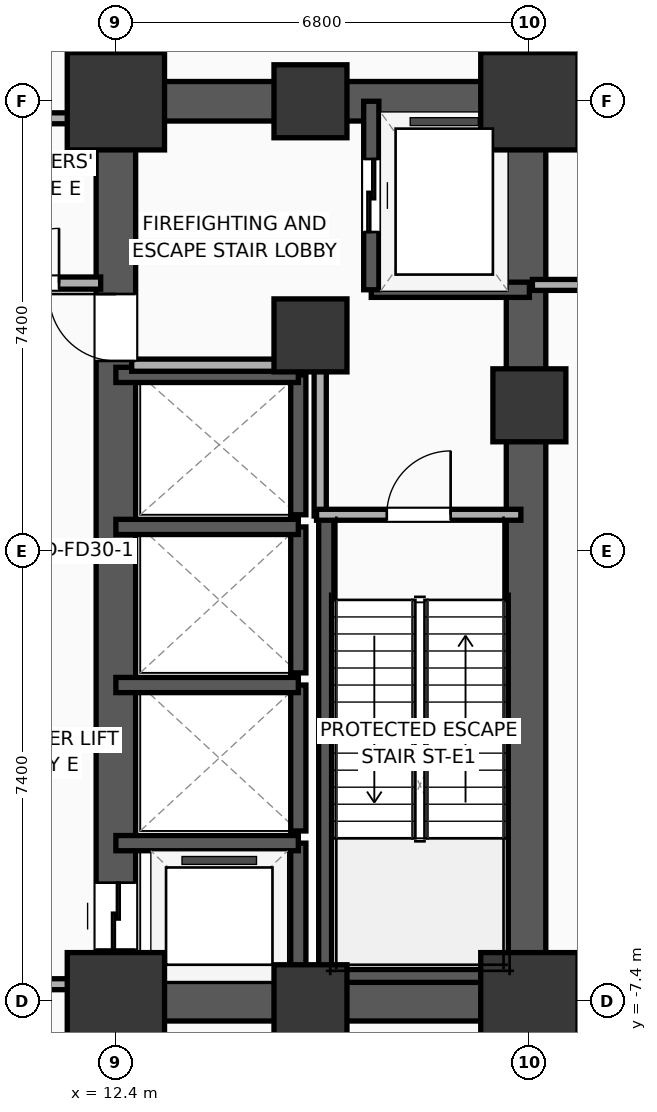
"""IFC4 building model, lengths in metres.
Left out: names, types, materials, properties, quantities, classifications, styles, units other than length and angle.
Written with IfcOpenShell. Run it as: python <this file> out.ifc"""

import sys

from ifc_helpers import new_model, si_unit, direction, frame, frame_2d, origin, origin_2d, place, context, subcontext, project, spatial, rectangle, extrude, element, fill, save


model = new_model("IFC4")
c1 = context("Model", 3, precision=1e-05, world=origin(), true_north=direction((0.0, 1.0)))
c2 = subcontext(c1, "Body", "Model", "MODEL_VIEW")
j1 = project(units=[si_unit("LENGTHUNIT", "METRE"), si_unit("PLANEANGLEUNIT", "RADIAN")], contexts=[c1])
p1 = place(None, origin())
s1 = spatial("IfcSite", under=j1, at=p1, CompositionType="ELEMENT")
p2 = place(p1, origin())
s2 = spatial("IfcBuilding", under=s1, at=p2, CompositionType="ELEMENT")
p3 = place(p2, frame((0.0, 0.0, 20.8)))
s3 = spatial("IfcBuildingStorey", under=s2, at=p3, CompositionType="ELEMENT", Elevation=20.8)
p4 = place(p3, frame((12.4, -7.4, 0.0), z_axis=(0.0, 0.0, 1.0), x_axis=(1.0, 0.0, 0.0)))
e1 = element("IfcColumn", 1, at=p4, inside=s3, PredefinedType="COLUMN", context=c2, shape_type="SweptSolid", body=[
    extrude(rectangle(XDim=1.6, YDim=1.6, at=origin_2d()), origin(), (0.0, 0.0, 1.0), 5.2),
])
p5 = place(p3, frame((15.6, 3.55, 0.0), z_axis=(0.0, 0.0, 1.0), x_axis=(1.0, 0.0, 0.0)))
e2 = element("IfcColumn", 2, at=p5, inside=s3, PredefinedType="COLUMN", context=c2, shape_type="SweptSolid", body=[
    extrude(rectangle(XDim=1.2, YDim=1.2, at=origin_2d()), origin(), (0.0, 0.0, 1.0), 5.2),
])
p6 = place(p3, frame((12.4, 7.4, 0.0), z_axis=(0.0, 0.0, 1.0), x_axis=(1.0, 0.0, 0.0)))
e3 = element("IfcColumn", 3, at=p6, inside=s3, PredefinedType="COLUMN", context=c2, shape_type="SweptSolid", body=[
    extrude(rectangle(XDim=1.6, YDim=1.6, at=origin_2d()), origin(), (0.0, 0.0, 1.0), 5.2),
])
for number, where, z_axis, x_axis in (
    (4, (15.6, -7.4, 0.0), (0.0, 0.0, 1.0), (1.0, 0.0, 0.0)),
    (5, (15.6, 7.4, 0.0), (0.0, 0.0, 1.0), (1.0, 0.0, 0.0)),
):
    element("IfcColumn", number, at=place(p3, frame(where, z_axis=z_axis, x_axis=x_axis)), inside=s3, PredefinedType="COLUMN", context=c2, shape_type="SweptSolid", body=[
        extrude(rectangle(XDim=1.2, YDim=1.2, at=origin_2d()), origin(), (0.0, 0.0, 1.0), 5.2),
    ])
p7 = place(p3, frame((19.2, -7.4, 0.0), z_axis=(0.0, 0.0, 1.0), x_axis=(1.0, 0.0, 0.0)))
e6 = element("IfcColumn", 6, at=p7, inside=s3, PredefinedType="COLUMN", context=c2, shape_type="SweptSolid", body=[
    extrude(rectangle(XDim=1.6, YDim=1.6, at=origin_2d()), origin(), (0.0, 0.0, 1.0), 5.2),
])
p8 = place(p3, frame((19.2, 2.4, 0.0), z_axis=(0.0, 0.0, 1.0), x_axis=(1.0, 0.0, 0.0)))
e7 = element("IfcColumn", 7, at=p8, inside=s3, PredefinedType="COLUMN", context=c2, shape_type="SweptSolid", body=[
    extrude(rectangle(XDim=1.2, YDim=1.2, at=origin_2d()), origin(), (0.0, 0.0, 1.0), 5.2),
])
p9 = place(p3, frame((19.2, 7.4, 0.0), z_axis=(0.0, 0.0, 1.0), x_axis=(1.0, 0.0, 0.0)))
e8 = element("IfcColumn", 8, at=p9, inside=s3, PredefinedType="COLUMN", context=c2, shape_type="SweptSolid", body=[
    extrude(rectangle(XDim=1.6, YDim=1.6, at=origin_2d()), origin(), (0.0, 0.0, 1.0), 5.2),
])
for number, where, z_axis, x_axis in (
    (9, (12.075, -7.4, 0.0), (0.0, 0.0, 1.0), (1.0, 0.0, 0.0)),
    (10, (12.075, 7.4, 0.0), (0.0, 0.0, 1.0), (1.0, 0.0, 0.0)),
):
    element("IfcWall", number, at=place(p3, frame(where, z_axis=z_axis, x_axis=x_axis)), inside=s3, PredefinedType="SHEAR", context=c2, shape_type="SweptSolid", body=[
        extrude(rectangle(XDim=7.45, YDim=0.65, at=frame_2d((3.725, 0.0))), origin(), (0.0, 0.0, 1.0), 4.95),
    ])
p10 = place(p3, frame((12.4, -7.4, 0.0), z_axis=(0.0, 0.0, 1.0), x_axis=(0.0, 1.0, 0.0)))
e11 = element("IfcWall", 11, at=p10, inside=s3, PredefinedType="SHEAR", context=c2, shape_type="SweptSolid", body=[
    extrude(rectangle(XDim=14.8, YDim=0.65, at=frame_2d((7.4, 0.0))), origin(), (0.0, 0.0, 1.0), 4.95),
])
p11 = place(p10, frame((0.85, 0.0, 0.0)))
e12 = element("IfcOpeningElement", 12, at=p11, cuts=e11, PredefinedType="OPENING", context=c2, shape_type="SweptSolid", body=[
    extrude(rectangle(XDim=1.1, YDim=2.05, at=frame_2d((0.55, 1.025))), frame((0.0, 0.335, 0.0), z_axis=(0.0, -1.0, 0.0), x_axis=(1.0, 0.0, 0.0)), (0.0, 0.0, 1.0), 0.67),
])
p12 = place(p10, frame((10.53, 0.0, 0.0)))
e13 = element("IfcOpeningElement", 13, at=p12, cuts=e11, PredefinedType="OPENING", context=c2, shape_type="SweptSolid", body=[
    extrude(rectangle(XDim=1.1, YDim=2.05, at=frame_2d((0.55, 1.025))), frame((0.0, 0.335, 0.0), z_axis=(0.0, -1.0, 0.0), x_axis=(1.0, 0.0, 0.0)), (0.0, 0.0, 1.0), 0.67),
])
p13 = place(p3, frame((19.145, -7.4, 0.0), z_axis=(0.0, 0.0, 1.0), x_axis=(0.0, 1.0, 0.0)))
e14 = element("IfcWall", 14, at=p13, inside=s3, PredefinedType="SHEAR", context=c2, shape_type="SweptSolid", body=[
    extrude(rectangle(XDim=14.8, YDim=0.65, at=frame_2d((7.4, 0.0))), origin(), (0.0, 0.0, 1.0), 4.95),
])
p14 = place(p3, frame((15.86, -7.085, 0.0), z_axis=(0.0, 0.0, 1.0), x_axis=(0.0, 1.0, 0.0)))
e15 = element("IfcWall", 15, at=p14, inside=s3, PredefinedType="SOLIDWALL", context=c2, shape_type="SweptSolid", body=[
    extrude(rectangle(XDim=7.685, YDim=0.25, at=frame_2d((3.843, 0.0))), origin(), (0.0, 0.0, 1.0), 4.95),
])
p15 = place(p3, frame((15.74, -6.965, 0.0), z_axis=(0.0, 0.0, 1.0), x_axis=(1.0, 0.0, 0.0)))
e16 = element("IfcWall", 16, at=p15, inside=s3, PredefinedType="SOLIDWALL", context=c2, shape_type="SweptSolid", body=[
    extrude(rectangle(XDim=3.46, YDim=0.25, at=frame_2d((1.73, 0.0))), origin(), (0.0, 0.0, 1.0), 4.95),
])
p16 = place(p3, frame((16.6, 4.3, 0.0), z_axis=(0.0, 0.0, 1.0), x_axis=(1.0, 0.0, 0.0)))
e17 = element("IfcWall", 17, at=p16, inside=s3, PredefinedType="SOLIDWALL", context=c2, shape_type="SweptSolid", body=[
    extrude(rectangle(XDim=2.6, YDim=0.25, at=frame_2d((1.3, 0.0))), origin(), (0.0, 0.0, 1.0), 4.95),
])
p17 = place(p3, frame((16.6, 7.4, 0.0), z_axis=(0.0, 0.0, 1.0), x_axis=(0.0, -1.0, 0.0)))
e18 = element("IfcWall", 18, at=p17, inside=s3, PredefinedType="SOLIDWALL", context=c2, shape_type="SweptSolid", body=[
    extrude(rectangle(XDim=3.1, YDim=0.25, at=frame_2d((1.55, 0.0))), origin(), (0.0, 0.0, 1.0), 4.95),
])
p18 = place(p17, frame((0.95, 0.0, 0.0)))
e19 = element("IfcOpeningElement", 19, at=p18, cuts=e18, PredefinedType="OPENING", context=c2, shape_type="SweptSolid", body=[
    extrude(rectangle(XDim=1.2, YDim=2.05, at=frame_2d((0.6, 1.025))), frame((0.0, 0.135, 0.0), z_axis=(0.0, -1.0, 0.0), x_axis=(1.0, 0.0, 0.0)), (0.0, 0.0, 1.0), 0.27),
])
p19 = place(p3, frame((15.4, -7.4, 0.0), z_axis=(0.0, 0.0, 1.0), x_axis=(0.0, 1.0, 0.0)))
e20 = element("IfcWall", 20, at=p19, inside=s3, PredefinedType="SOLIDWALL", context=c2, shape_type="SweptSolid", body=[
    extrude(rectangle(XDim=2.6, YDim=0.25, at=frame_2d((1.3, 0.0))), origin(), (0.0, 0.0, 1.0), 4.95),
])
p20 = place(p3, frame((15.4, -4.8, 0.0), z_axis=(0.0, 0.0, 1.0), x_axis=(-1.0, 0.0, 0.0)))
e21 = element("IfcWall", 21, at=p20, inside=s3, PredefinedType="SOLIDWALL", context=c2, shape_type="SweptSolid", body=[
    extrude(rectangle(XDim=3.0, YDim=0.25, at=frame_2d((1.5, 0.0))), origin(), (0.0, 0.0, 1.0), 4.95),
])
p21 = place(p3, frame((15.4, -4.6, 0.0), z_axis=(0.0, 0.0, 1.0), x_axis=(0.0, 1.0, 0.0)))
e22 = element("IfcWall", 22, at=p21, inside=s3, PredefinedType="SOLIDWALL", context=c2, shape_type="SweptSolid", body=[
    extrude(rectangle(XDim=2.4, YDim=0.25, at=frame_2d((1.2, 0.0))), origin(), (0.0, 0.0, 1.0), 4.95),
])
p22 = place(p3, frame((15.4, -2.2, 0.0), z_axis=(0.0, 0.0, 1.0), x_axis=(-1.0, 0.0, 0.0)))
e23 = element("IfcWall", 23, at=p22, inside=s3, PredefinedType="SOLIDWALL", context=c2, shape_type="SweptSolid", body=[
    extrude(rectangle(XDim=3.0, YDim=0.25, at=frame_2d((1.5, 0.0))), origin(), (0.0, 0.0, 1.0), 4.95),
])
p23 = place(p3, frame((15.4, -2.0, 0.0), z_axis=(0.0, 0.0, 1.0), x_axis=(0.0, 1.0, 0.0)))
e24 = element("IfcWall", 24, at=p23, inside=s3, PredefinedType="SOLIDWALL", context=c2, shape_type="SweptSolid", body=[
    extrude(rectangle(XDim=2.4, YDim=0.25, at=frame_2d((1.2, 0.0))), origin(), (0.0, 0.0, 1.0), 4.95),
])
p24 = place(p3, frame((15.4, 0.4, 0.0), z_axis=(0.0, 0.0, 1.0), x_axis=(-1.0, 0.0, 0.0)))
e25 = element("IfcWall", 25, at=p24, inside=s3, PredefinedType="SOLIDWALL", context=c2, shape_type="SweptSolid", body=[
    extrude(rectangle(XDim=3.0, YDim=0.25, at=frame_2d((1.5, 0.0))), origin(), (0.0, 0.0, 1.0), 4.95),
])
p25 = place(p3, frame((15.4, 0.6, 0.0), z_axis=(0.0, 0.0, 1.0), x_axis=(0.0, 1.0, 0.0)))
e26 = element("IfcWall", 26, at=p25, inside=s3, PredefinedType="SOLIDWALL", context=c2, shape_type="SweptSolid", body=[
    extrude(rectangle(XDim=2.3, YDim=0.25, at=frame_2d((1.15, 0.0))), origin(), (0.0, 0.0, 1.0), 4.95),
])
p26 = place(p3, frame((15.4, 2.9, 0.0), z_axis=(0.0, 0.0, 1.0), x_axis=(-1.0, 0.0, 0.0)))
e27 = element("IfcWall", 27, at=p26, inside=s3, PredefinedType="SOLIDWALL", context=c2, shape_type="SweptSolid", body=[
    extrude(rectangle(XDim=3.0, YDim=0.25, at=frame_2d((1.5, 0.0))), origin(), (0.0, 0.0, 1.0), 4.95),
])
p27 = place(p3, frame((15.76, 0.58, 0.0), z_axis=(0.0, 0.0, 1.0), x_axis=(0.0, 1.0, 0.0)))
e28 = element("IfcWall", 28, at=p27, inside=s3, PredefinedType="PARTITIONING", context=c2, shape_type="SweptSolid", body=[
    extrude(rectangle(XDim=2.52, YDim=0.2, at=frame_2d((1.26, 0.0))), origin(), (0.0, 0.0, 1.0), 4.95),
])
p28 = place(p3, frame((12.66, 3.06, 0.0), z_axis=(0.0, 0.0, 1.0), x_axis=(1.0, 0.0, 0.0)))
e29 = element("IfcWall", 29, at=p28, inside=s3, PredefinedType="PARTITIONING", context=c2, shape_type="SweptSolid", body=[
    extrude(rectangle(XDim=3.16, YDim=0.2, at=frame_2d((1.58, 0.0))), origin(), (0.0, 0.0, 1.0), 4.95),
])
p29 = place(p3, frame((15.7, 0.6, 0.0), z_axis=(0.0, 0.0, 1.0), x_axis=(1.0, 0.0, 0.0)))
e30 = element("IfcWall", 30, at=p29, inside=s3, PredefinedType="PARTITIONING", context=c2, shape_type="SweptSolid", body=[
    extrude(rectangle(XDim=3.36, YDim=0.18, at=frame_2d((1.68, 0.0))), origin(), (0.0, 0.0, 1.0), 4.95),
])
p30 = place(p29, frame((1.155, 0.0, 0.0)))
e31 = element("IfcOpeningElement", 31, at=p30, cuts=e30, PredefinedType="OPENING", context=c2, shape_type="SweptSolid", body=[
    extrude(rectangle(XDim=1.05, YDim=2.05, at=frame_2d((0.525, 1.025))), frame((0.0, 0.1, 0.0), z_axis=(0.0, -1.0, 0.0), x_axis=(1.0, 0.0, 0.0)), (0.0, 0.0, 1.0), 0.2),
])
p31 = place(p3, frame((9.88, 4.41, 0.0), z_axis=(0.0, 0.0, 1.0), x_axis=(1.0, 0.0, 0.0)))
e32 = element("IfcWall", 32, at=p31, inside=s3, PredefinedType="PARTITIONING", context=c2, shape_type="SweptSolid", body=[
    extrude(rectangle(XDim=2.27, YDim=0.2, at=frame_2d((1.135, 0.0))), origin(), (0.0, 0.0, 1.0), 4.95),
])
p32 = place(p31, frame((0.685, 0.0, 0.0)))
e33 = element("IfcOpeningElement", 33, at=p32, cuts=e32, PredefinedType="OPENING", context=c2, shape_type="SweptSolid", body=[
    extrude(rectangle(XDim=0.9, YDim=2.05, at=frame_2d((0.45, 1.025))), frame((0.0, 0.11, 0.0), z_axis=(0.0, -1.0, 0.0), x_axis=(1.0, 0.0, 0.0)), (0.0, 0.0, 1.0), 0.22),
])
for number, where, z_axis, x_axis in (
    (34, (9.88, 7.12, 0.0), (0.0, 0.0, 1.0), (1.0, 0.0, 0.0)),
    (35, (9.88, -7.12, 0.0), (0.0, 0.0, 1.0), (1.0, 0.0, 0.0)),
):
    element("IfcWall", number, at=place(p3, frame(where, z_axis=z_axis, x_axis=x_axis)), inside=s3, PredefinedType="PARTITIONING", context=c2, shape_type="SweptSolid", body=[
        extrude(rectangle(XDim=2.27, YDim=0.18, at=frame_2d((1.135, 0.0))), origin(), (0.0, 0.0, 1.0), 4.95),
    ])
p33 = place(p3, frame((19.25, 4.38, 0.0), z_axis=(0.0, 0.0, 1.0), x_axis=(1.0, 0.0, 0.0)))
e36 = element("IfcWall", 36, at=p33, inside=s3, PredefinedType="PARTITIONING", context=c2, shape_type="SweptSolid", body=[
    extrude(rectangle(XDim=15.95, YDim=0.18, at=frame_2d((7.975, 0.0))), origin(), (0.0, 0.0, 1.0), 4.95),
])
p34 = place(p33, frame((5.107, 0.0, 0.0)))
e37 = element("IfcOpeningElement", 37, at=p34, cuts=e36, PredefinedType="OPENING", context=c2, shape_type="SweptSolid", body=[
    extrude(rectangle(XDim=0.95, YDim=2.05, at=frame_2d((0.475, 1.025))), frame((0.0, 0.1, 0.0), z_axis=(0.0, -1.0, 0.0), x_axis=(1.0, 0.0, 0.0)), (0.0, 0.0, 1.0), 0.2),
])
p35 = place(p18, origin())
e38 = element("IfcDoor", 38, at=p35, inside=s3, OperationType="SLIDING_TO_LEFT", PredefinedType="DOOR", context=c2, shape_type="SweptSolid", body=[
    extrude(rectangle(XDim=1.2, YDim=2.05, at=frame_2d((0.6, 1.025))), frame((0.0, 0.025, 0.0), z_axis=(0.0, -1.0, 0.0), x_axis=(1.0, 0.0, 0.0)), (0.0, 0.0, 1.0), 0.05),
])
fill(e19, e38)
p36 = place(p11, origin())
e39 = element("IfcDoor", 39, at=p36, inside=s3, OperationType="SLIDING_TO_LEFT", PredefinedType="DOOR", context=c2, shape_type="SweptSolid", body=[
    extrude(rectangle(XDim=1.1, YDim=2.05, at=frame_2d((0.55, 1.025))), frame((0.0, 0.025, 0.0), z_axis=(0.0, -1.0, 0.0), x_axis=(1.0, 0.0, 0.0)), (0.0, 0.0, 1.0), 0.05),
])
fill(e12, e39)
p37 = place(p30, origin())
e40 = element("IfcDoor", 40, at=p37, inside=s3, OperationType="SINGLE_SWING_RIGHT", PredefinedType="DOOR", context=c2, shape_type="SweptSolid", body=[
    extrude(rectangle(XDim=1.05, YDim=2.05, at=frame_2d((0.525, 1.025))), frame((0.0, 0.025, 0.0), z_axis=(0.0, -1.0, 0.0), x_axis=(1.0, 0.0, 0.0)), (0.0, 0.0, 1.0), 0.05),
])
fill(e31, e40)
p38 = place(p32, origin())
e41 = element("IfcDoor", 41, at=p38, inside=s3, OperationType="SINGLE_SWING_RIGHT", PredefinedType="DOOR", context=c2, shape_type="SweptSolid", body=[
    extrude(rectangle(XDim=0.9, YDim=2.05, at=frame_2d((0.45, 1.025))), frame((0.0, 0.025, 0.0), z_axis=(0.0, -1.0, 0.0), x_axis=(1.0, 0.0, 0.0)), (0.0, 0.0, 1.0), 0.05),
])
fill(e33, e41)
p39 = place(p12, origin())
e42 = element("IfcDoor", 42, at=p39, inside=s3, OperationType="SINGLE_SWING_RIGHT", PredefinedType="DOOR", context=c2, shape_type="SweptSolid", body=[
    extrude(rectangle(XDim=1.1, YDim=2.05, at=frame_2d((0.55, 1.025))), frame((0.0, 0.025, 0.0), z_axis=(0.0, -1.0, 0.0), x_axis=(1.0, 0.0, 0.0)), (0.0, 0.0, 1.0), 0.05),
])
fill(e13, e42)
save(model, sys.argv[1])
